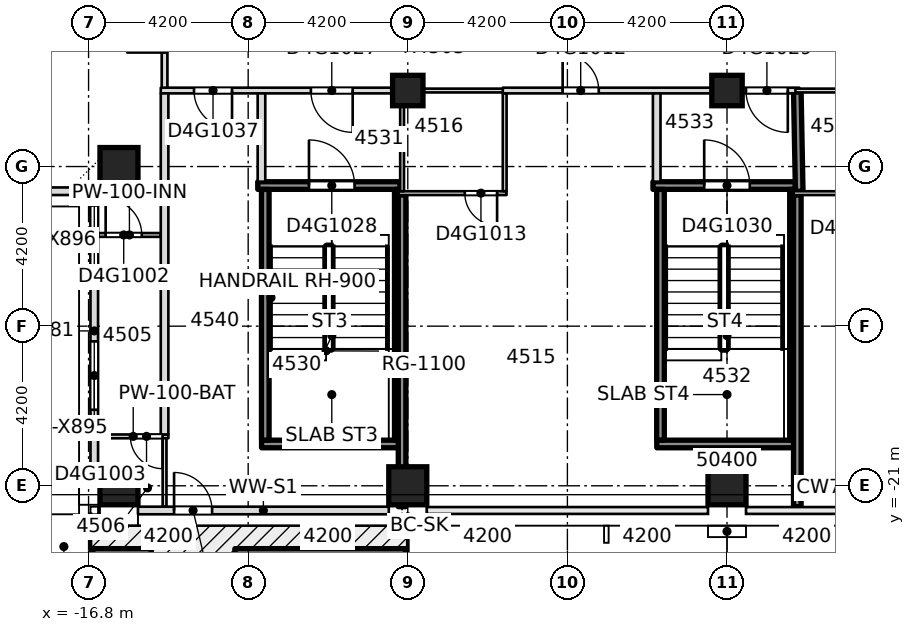
"""IFC4 building model, lengths in metres.
Left out: names, types, materials, properties, quantities, classifications, styles, units other than length and angle.
Written with IfcOpenShell. Run it as: python <this file> out.ifc"""

import sys

from ifc_helpers import new_model, si_unit, direction, frame, frame_2d, origin, origin_2d, place, context, subcontext, project, spatial, rectangle, extrude, element, fill, save


model = new_model("IFC4")
c1 = context("Model", 3, precision=1e-05, world=origin(), true_north=direction((0.0, 1.0)))
c2 = subcontext(c1, "Body", "Model", "MODEL_VIEW")
j1 = project(units=[si_unit("LENGTHUNIT", "METRE"), si_unit("PLANEANGLEUNIT", "RADIAN")], contexts=[c1])
p1 = place(None, origin())
s1 = spatial("IfcSite", under=j1, at=p1, CompositionType="ELEMENT")
p2 = place(p1, origin())
s2 = spatial("IfcBuilding", under=s1, at=p2, CompositionType="ELEMENT")
p3 = place(p2, frame((0.0, 0.0, 175.55)))
s3 = spatial("IfcBuildingStorey", under=s2, at=p3, CompositionType="ELEMENT", Elevation=175.55)
for number, where, z_axis, x_axis in (
    (1, (-16.0, -21.0, -0.4), (0.0, 0.0, 1.0), (1.0, 0.0, 0.0)),
    (2, (-8.4, -21.0, -0.4), (0.0, 0.0, 1.0), (1.0, 0.0, 0.0)),
    (3, (0.0, -21.0, -0.4), (0.0, 0.0, 1.0), (1.0, 0.0, 0.0)),
    (4, (-16.0, -12.6, -0.4), (0.0, 0.0, 1.0), (1.0, 0.0, 0.0)),
):
    element("IfcColumn", number, at=place(p3, frame(where, z_axis=z_axis, x_axis=x_axis)), inside=s3, PredefinedType="COLUMN", context=c2, shape_type="SweptSolid", body=[
        extrude(rectangle(XDim=1.0, YDim=1.0, at=origin_2d()), origin(), (0.0, 0.0, 1.0), 3.45),
    ])
for number, where, z_axis, x_axis in (
    (5, (-8.4, -10.6, -0.4), (0.0, 0.0, 1.0), (1.0, 0.0, 0.0)),
    (6, (0.0, -10.6, -0.4), (0.0, 0.0, 1.0), (1.0, 0.0, 0.0)),
):
    element("IfcColumn", number, at=place(p3, frame(where, z_axis=z_axis, x_axis=x_axis)), inside=s3, PredefinedType="COLUMN", context=c2, shape_type="SweptSolid", body=[
        extrude(rectangle(XDim=0.8, YDim=0.8, at=origin_2d()), origin(), (0.0, 0.0, 1.0), 3.45),
    ])
p4 = place(p3, frame((-16.55, -19.7, 0.0), z_axis=(0.0, 0.0, 1.0), x_axis=(1.0, 0.0, 0.0)))
e7 = element("IfcWall", 7, at=p4, inside=s3, PredefinedType="PARTITIONING", context=c2, shape_type="SweptSolid", body=[
    extrude(rectangle(XDim=1.85, YDim=0.1, at=frame_2d((0.925, 0.0))), origin(), (0.0, 0.0, 1.0), 3.05),
])
p5 = place(p4, frame((0.85, 0.0, 0.0)))
e8 = element("IfcOpeningElement", 8, at=p5, cuts=e7, PredefinedType="OPENING", context=c2, shape_type="SweptSolid", body=[
    extrude(rectangle(XDim=0.85, YDim=2.1, at=frame_2d((0.425, 1.05))), frame((0.0, 0.06, 0.0), z_axis=(0.0, -1.0, 0.0), x_axis=(1.0, 0.0, 0.0)), (0.0, 0.0, 1.0), 0.12),
])
p6 = place(p3, frame((-12.248, -19.9, 0.0), z_axis=(0.0, 0.0, 1.0), x_axis=(1.0, 0.0, 0.0)))
e9 = element("IfcWall", 9, at=p6, inside=s3, PredefinedType="SOLIDWALL", context=c2, shape_type="SweptSolid", body=[
    extrude(rectangle(XDim=3.696, YDim=0.2, at=frame_2d((1.848, 0.0))), origin(), (0.0, 0.0, 1.0), 3.05),
])
p7 = place(p3, frame((-1.848, -19.9, 0.0), z_axis=(0.0, 0.0, 1.0), x_axis=(1.0, 0.0, 0.0)))
e10 = element("IfcWall", 10, at=p7, inside=s3, PredefinedType="SOLIDWALL", context=c2, shape_type="SweptSolid", body=[
    extrude(rectangle(XDim=3.696, YDim=0.2, at=frame_2d((1.848, 0.0))), origin(), (0.0, 0.0, 1.0), 3.05),
])
p8 = place(p3, frame((-16.55, -14.4, 0.0), z_axis=(0.0, 0.0, 1.0), x_axis=(1.0, 0.0, 0.0)))
e11 = element("IfcWall", 11, at=p8, inside=s3, PredefinedType="PARTITIONING", context=c2, shape_type="SweptSolid", body=[
    extrude(rectangle(XDim=1.65, YDim=0.1, at=frame_2d((0.825, 0.0))), origin(), (0.0, 0.0, 1.0), 3.05),
])
p9 = place(p8, frame((0.2, 0.0, 0.0)))
e12 = element("IfcOpeningElement", 12, at=p9, cuts=e11, PredefinedType="OPENING", context=c2, shape_type="SweptSolid", body=[
    extrude(rectangle(XDim=0.95, YDim=2.1, at=frame_2d((0.475, 1.05))), frame((0.0, 0.06, 0.0), z_axis=(0.0, -1.0, 0.0), x_axis=(1.0, 0.0, 0.0)), (0.0, 0.0, 1.0), 0.12),
])
p10 = place(p3, frame((-8.65, -13.3, 0.0), z_axis=(0.0, 0.0, 1.0), x_axis=(1.0, 0.0, 0.0)))
e13 = element("IfcWall", 13, at=p10, inside=s3, PredefinedType="PARTITIONING", context=c2, shape_type="SweptSolid", body=[
    extrude(rectangle(XDim=2.848, YDim=0.1, at=frame_2d((1.424, 0.0))), origin(), (0.0, 0.0, 1.0), 3.05),
])
p11 = place(p10, frame((1.75, 0.0, 0.0)))
e14 = element("IfcOpeningElement", 14, at=p11, cuts=e13, PredefinedType="OPENING", context=c2, shape_type="SweptSolid", body=[
    extrude(rectangle(XDim=0.85, YDim=2.1, at=frame_2d((0.425, 1.05))), frame((0.0, 0.06, 0.0), z_axis=(0.0, -1.0, 0.0), x_axis=(1.0, 0.0, 0.0)), (0.0, 0.0, 1.0), 0.12),
])
p12 = place(p3, frame((1.75, -13.3, 0.0), z_axis=(0.0, 0.0, 1.0), x_axis=(1.0, 0.0, 0.0)))
e15 = element("IfcWall", 15, at=p12, inside=s3, PredefinedType="PARTITIONING", context=c2, shape_type="SweptSolid", body=[
    extrude(rectangle(XDim=2.85, YDim=0.1, at=frame_2d((1.425, 0.0))), origin(), (0.0, 0.0, 1.0), 3.05),
])
p13 = place(p12, frame((1.75, 0.0, 0.0)))
e16 = element("IfcOpeningElement", 16, at=p13, cuts=e15, PredefinedType="OPENING", context=c2, shape_type="SweptSolid", body=[
    extrude(rectangle(XDim=0.85, YDim=2.1, at=frame_2d((0.425, 1.05))), frame((0.0, 0.06, 0.0), z_axis=(0.0, -1.0, 0.0), x_axis=(1.0, 0.0, 0.0)), (0.0, 0.0, 1.0), 0.12),
])
p14 = place(p3, frame((-12.348, -13.1, 0.0), z_axis=(0.0, 0.0, 1.0), x_axis=(1.0, 0.0, 0.0)))
e17 = element("IfcWall", 17, at=p14, inside=s3, PredefinedType="SOLIDWALL", context=c2, shape_type="SweptSolid", body=[
    extrude(rectangle(XDim=3.746, YDim=0.2, at=frame_2d((1.873, 0.0))), origin(), (0.0, 0.0, 1.0), 3.05),
])
p15 = place(p14, frame((1.348, 0.0, 0.0)))
e18 = element("IfcOpeningElement", 18, at=p15, cuts=e17, PredefinedType="OPENING", context=c2, shape_type="SweptSolid", body=[
    extrude(rectangle(XDim=1.2, YDim=2.1, at=frame_2d((0.6, 1.05))), frame((0.0, 0.11, 0.0), z_axis=(0.0, -1.0, 0.0), x_axis=(1.0, 0.0, 0.0)), (0.0, 0.0, 1.0), 0.22),
])
p16 = place(p3, frame((-1.948, -13.1, 0.0), z_axis=(0.0, 0.0, 1.0), x_axis=(1.0, 0.0, 0.0)))
e19 = element("IfcWall", 19, at=p16, inside=s3, PredefinedType="SOLIDWALL", context=c2, shape_type="SweptSolid", body=[
    extrude(rectangle(XDim=3.746, YDim=0.2, at=frame_2d((1.873, 0.0))), origin(), (0.0, 0.0, 1.0), 3.05),
])
p17 = place(p16, frame((1.348, 0.0, 0.0)))
e20 = element("IfcOpeningElement", 20, at=p17, cuts=e19, PredefinedType="OPENING", context=c2, shape_type="SweptSolid", body=[
    extrude(rectangle(XDim=1.2, YDim=2.1, at=frame_2d((0.6, 1.05))), frame((0.0, 0.11, 0.0), z_axis=(0.0, -1.0, 0.0), x_axis=(1.0, 0.0, 0.0)), (0.0, 0.0, 1.0), 0.22),
])
p18 = place(p3, frame((-14.9, -10.6, 0.0), z_axis=(0.0, 0.0, 1.0), x_axis=(1.0, 0.0, 0.0)))
e21 = element("IfcWall", 21, at=p18, inside=s3, PredefinedType="PARTITIONING", context=c2, shape_type="SweptSolid", body=[
    extrude(rectangle(XDim=6.4, YDim=0.15, at=frame_2d((3.2, 0.0))), origin(), (0.0, 0.0, 1.0), 3.05),
])
p19 = place(p18, frame((3.95, 0.0, 0.0)))
e22 = element("IfcOpeningElement", 22, at=p19, cuts=e21, PredefinedType="OPENING", context=c2, shape_type="SweptSolid", body=[
    extrude(rectangle(XDim=1.1, YDim=2.1, at=frame_2d((0.55, 1.05))), frame((0.0, 0.085, 0.0), z_axis=(0.0, -1.0, 0.0), x_axis=(1.0, 0.0, 0.0)), (0.0, 0.0, 1.0), 0.17),
])
p20 = place(p18, frame((0.875, 0.0, 0.0)))
e23 = element("IfcOpeningElement", 23, at=p20, cuts=e21, PredefinedType="OPENING", context=c2, shape_type="SweptSolid", body=[
    extrude(rectangle(XDim=1.0, YDim=2.1, at=frame_2d((0.5, 1.05))), frame((0.0, 0.085, 0.0), z_axis=(0.0, -1.0, 0.0), x_axis=(1.0, 0.0, 0.0)), (0.0, 0.0, 1.0), 0.17),
])
p21 = place(p3, frame((-8.6, -10.6, 0.0), z_axis=(0.0, 0.0, 1.0), x_axis=(1.0, 0.0, 0.0)))
e24 = element("IfcWall", 24, at=p21, inside=s3, PredefinedType="PARTITIONING", context=c2, shape_type="SweptSolid", body=[
    extrude(rectangle(XDim=2.8, YDim=0.1, at=frame_2d((1.4, 0.0))), origin(), (0.0, 0.0, 1.0), 3.05),
])
p22 = place(p3, frame((-5.9, -10.6, 0.0), z_axis=(0.0, 0.0, 1.0), x_axis=(1.0, 0.0, 0.0)))
e25 = element("IfcWall", 25, at=p22, inside=s3, PredefinedType="PARTITIONING", context=c2, shape_type="SweptSolid", body=[
    extrude(rectangle(XDim=7.8, YDim=0.15, at=frame_2d((3.9, 0.0))), origin(), (0.0, 0.0, 1.0), 3.05),
])
p23 = place(p22, frame((1.575, 0.0, 0.0)))
e26 = element("IfcOpeningElement", 26, at=p23, cuts=e25, PredefinedType="OPENING", context=c2, shape_type="SweptSolid", body=[
    extrude(rectangle(XDim=0.95, YDim=2.1, at=frame_2d((0.475, 1.05))), frame((0.0, 0.085, 0.0), z_axis=(0.0, -1.0, 0.0), x_axis=(1.0, 0.0, 0.0)), (0.0, 0.0, 1.0), 0.17),
])
p24 = place(p22, frame((6.4, 0.0, 0.0)))
e27 = element("IfcOpeningElement", 27, at=p24, cuts=e25, PredefinedType="OPENING", context=c2, shape_type="SweptSolid", body=[
    extrude(rectangle(XDim=1.1, YDim=2.1, at=frame_2d((0.55, 1.05))), frame((0.0, 0.085, 0.0), z_axis=(0.0, -1.0, 0.0), x_axis=(1.0, 0.0, 0.0)), (0.0, 0.0, 1.0), 0.17),
])
p25 = place(p3, frame((1.8, -10.6, 0.0), z_axis=(0.0, 0.0, 1.0), x_axis=(1.0, 0.0, 0.0)))
e28 = element("IfcWall", 28, at=p25, inside=s3, PredefinedType="PARTITIONING", context=c2, shape_type="SweptSolid", body=[
    extrude(rectangle(XDim=2.8, YDim=0.1, at=frame_2d((1.4, 0.0))), origin(), (0.0, 0.0, 1.0), 3.05),
])
p26 = place(p3, frame((-14.8, -21.55, 0.0), z_axis=(0.0, 0.0, 1.0), x_axis=(0.0, 1.0, 0.0)))
e29 = element("IfcWall", 29, at=p26, inside=s3, PredefinedType="PARTITIONING", context=c2, shape_type="SweptSolid", body=[
    extrude(rectangle(XDim=1.8, YDim=0.1, at=frame_2d((0.9, 0.0))), origin(), (0.0, 0.0, 1.0), 3.05),
])
p27 = place(p3, frame((-14.8, -19.65, 0.0), z_axis=(0.0, 0.0, 1.0), x_axis=(0.0, 1.0, 0.0)))
e30 = element("IfcWall", 30, at=p27, inside=s3, PredefinedType="PARTITIONING", context=c2, shape_type="SweptSolid", body=[
    extrude(rectangle(XDim=8.975, YDim=0.2, at=frame_2d((4.487, 0.0))), origin(), (0.0, 0.0, 1.0), 3.05),
])
p28 = place(p3, frame((-14.8, -10.525, 0.0), z_axis=(0.0, 0.0, 1.0), x_axis=(0.0, 1.0, 0.0)))
e31 = element("IfcWall", 31, at=p28, inside=s3, PredefinedType="PARTITIONING", context=c2, shape_type="SweptSolid", body=[
    extrude(rectangle(XDim=18.965, YDim=0.15, at=frame_2d((9.482, 0.0))), origin(), (0.0, 0.0, 1.0), 3.05),
])
p29 = place(p28, frame((0.925, 0.0, 0.0)))
e32 = element("IfcOpeningElement", 32, at=p29, cuts=e31, PredefinedType="OPENING", context=c2, shape_type="SweptSolid", body=[
    extrude(rectangle(XDim=1.0, YDim=2.1, at=frame_2d((0.5, 1.05))), frame((0.0, 0.085, 0.0), z_axis=(0.0, -1.0, 0.0), x_axis=(1.0, 0.0, 0.0)), (0.0, 0.0, 1.0), 0.17),
])
p30 = place(p28, frame((15.97, 0.0, 0.0)))
e33 = element("IfcOpeningElement", 33, at=p30, cuts=e31, PredefinedType="OPENING", context=c2, shape_type="SweptSolid", body=[
    extrude(rectangle(XDim=1.0, YDim=2.1, at=frame_2d((0.5, 1.05))), frame((0.0, 0.085, 0.0), z_axis=(0.0, -1.0, 0.0), x_axis=(1.0, 0.0, 0.0)), (0.0, 0.0, 1.0), 0.17),
])
p31 = place(p28, frame((9.975, 0.0, 0.0)))
e34 = element("IfcOpeningElement", 34, at=p31, cuts=e31, PredefinedType="OPENING", context=c2, shape_type="SweptSolid", body=[
    extrude(rectangle(XDim=1.1, YDim=2.1, at=frame_2d((0.55, 1.05))), frame((0.0, 0.085, 0.0), z_axis=(0.0, -1.0, 0.0), x_axis=(1.0, 0.0, 0.0)), (0.0, 0.0, 1.0), 0.17),
])
p32 = place(p28, frame((4.825, 0.0, 0.0)))
e35 = element("IfcOpeningElement", 35, at=p32, cuts=e31, PredefinedType="OPENING", context=c2, shape_type="SweptSolid", body=[
    extrude(rectangle(XDim=1.0, YDim=2.1, at=frame_2d((0.5, 1.05))), frame((0.0, 0.085, 0.0), z_axis=(0.0, -1.0, 0.0), x_axis=(1.0, 0.0, 0.0)), (0.0, 0.0, 1.0), 0.17),
])
p33 = place(p3, frame((-12.25, -12.998, 0.0), z_axis=(0.0, 0.0, 1.0), x_axis=(0.0, 1.0, 0.0)))
e36 = element("IfcWall", 36, at=p33, inside=s3, PredefinedType="PARTITIONING", context=c2, shape_type="SweptSolid", body=[
    extrude(rectangle(XDim=2.323, YDim=0.2, at=frame_2d((1.162, 0.0))), origin(), (0.0, 0.0, 1.0), 3.05),
])
for number, where, z_axis, x_axis in (
    (37, (-12.15, -19.798, 0.0), (0.0, 0.0, 1.0), (0.0, 1.0, 0.0)),
    (38, (-8.65, -19.798, 0.0), (0.0, 0.0, 1.0), (0.0, 1.0, 0.0)),
):
    element("IfcWall", number, at=place(p3, frame(where, z_axis=z_axis, x_axis=x_axis)), inside=s3, PredefinedType="SOLIDWALL", context=c2, shape_type="SweptSolid", body=[
        extrude(rectangle(XDim=6.596, YDim=0.2, at=frame_2d((3.298, 0.0))), origin(), (0.0, 0.0, 1.0), 3.05),
    ])
p34 = place(p3, frame((-8.55, -13.25, 0.0), z_axis=(0.0, 0.0, 1.0), x_axis=(0.0, 1.0, 0.0)))
e39 = element("IfcWall", 39, at=p34, inside=s3, PredefinedType="PARTITIONING", context=c2, shape_type="SweptSolid", body=[
    extrude(rectangle(XDim=2.575, YDim=0.1, at=frame_2d((1.288, 0.0))), origin(), (0.0, 0.0, 1.0), 3.05),
])
p35 = place(p3, frame((-5.85, -13.248, 0.0), z_axis=(0.0, 0.0, 1.0), x_axis=(0.0, 1.0, 0.0)))
e40 = element("IfcWall", 40, at=p35, inside=s3, PredefinedType="PARTITIONING", context=c2, shape_type="SweptSolid", body=[
    extrude(rectangle(XDim=2.573, YDim=0.1, at=frame_2d((1.287, 0.0))), origin(), (0.0, 0.0, 1.0), 3.05),
])
p36 = place(p3, frame((-1.85, -12.998, 0.0), z_axis=(0.0, 0.0, 1.0), x_axis=(0.0, 1.0, 0.0)))
e41 = element("IfcWall", 41, at=p36, inside=s3, PredefinedType="PARTITIONING", context=c2, shape_type="SweptSolid", body=[
    extrude(rectangle(XDim=2.323, YDim=0.2, at=frame_2d((1.162, 0.0))), origin(), (0.0, 0.0, 1.0), 3.05),
])
for number, where, z_axis, x_axis in (
    (42, (-1.75, -19.798, 0.0), (0.0, 0.0, 1.0), (0.0, 1.0, 0.0)),
    (43, (1.75, -19.798, 0.0), (0.0, 0.0, 1.0), (0.0, 1.0, 0.0)),
):
    element("IfcWall", number, at=place(p3, frame(where, z_axis=z_axis, x_axis=x_axis)), inside=s3, PredefinedType="SOLIDWALL", context=c2, shape_type="SweptSolid", body=[
        extrude(rectangle(XDim=6.596, YDim=0.2, at=frame_2d((3.298, 0.0))), origin(), (0.0, 0.0, 1.0), 3.05),
    ])
p37 = place(p3, frame((1.9, -13.25, 0.0), z_axis=(0.0, 0.0, 1.0), x_axis=(-0.019062755699, 0.999818289163, 0.0)))
e44 = element("IfcWall", 44, at=p37, inside=s3, PredefinedType="SOLIDWALL", context=c2, shape_type="SweptSolid", body=[
    extrude(rectangle(XDim=2.625, YDim=0.2, at=frame_2d((1.313, 0.0))), origin(), (0.0, 0.0, 1.0), 3.05),
])
p38 = place(p3, frame((-15.5, -21.65, 0.0), z_axis=(0.0, 0.0, 1.0), x_axis=(1.0, 0.0, 0.0)))
e45 = element("IfcWall", 45, at=p38, inside=s3, PredefinedType="STANDARD", context=c2, shape_type="SweptSolid", body=[
    extrude(rectangle(XDim=6.6, YDim=0.2, at=frame_2d((3.3, 0.0))), origin(), (0.0, 0.0, 1.0), 3.05),
])
p39 = place(p38, frame((0.95, 0.0, 0.0)))
e46 = element("IfcOpeningElement", 46, at=p39, cuts=e45, PredefinedType="OPENING", context=c2, shape_type="SweptSolid", body=[
    extrude(rectangle(XDim=1.0, YDim=2.4, at=frame_2d((0.5, 1.2))), frame((0.0, 0.11, 0.0), z_axis=(0.0, -1.0, 0.0), x_axis=(1.0, 0.0, 0.0)), (0.0, 0.0, 1.0), 0.22),
])
p40 = place(p3, frame((-16.69, -22.954, -0.04), z_axis=(0.0, 0.0, 1.0), x_axis=(1.0, 0.0, 0.0)))
e47 = element("IfcWall", 47, at=p40, inside=s3, PredefinedType="USERDEFINED", context=c2, shape_type="SweptSolid", body=[
    extrude(rectangle(XDim=1.54, YDim=0.6, at=frame_2d((0.77, 0.0))), origin(), (0.0, 0.0, 1.0), 1.2),
])
p41 = place(p3, frame((-12.95, -22.954, -0.04), z_axis=(0.0, 0.0, 1.0), x_axis=(1.0, 0.0, 0.0)))
e48 = element("IfcWall", 48, at=p41, inside=s3, PredefinedType="USERDEFINED", context=c2, shape_type="SweptSolid", body=[
    extrude(rectangle(XDim=4.49, YDim=0.6, at=frame_2d((2.245, 0.0))), origin(), (0.0, 0.0, 1.0), 1.2),
])
p42 = place(p3, frame((-24.7, -13.25, 0.0), z_axis=(0.0, 0.0, 1.0), x_axis=(1.0, 0.0, 0.0)))
e49 = element("IfcWall", 49, at=p42, inside=s3, PredefinedType="STANDARD", context=c2, shape_type="SweptSolid", body=[
    extrude(rectangle(XDim=7.95, YDim=0.2, at=frame_2d((3.975, 0.0))), origin(), (0.0, 0.0, 1.0), 3.05),
])
p43 = place(p3, frame((-16.65, -13.35, 0.0), z_axis=(0.0, 0.0, 1.0), x_axis=(0.0, -1.0, 0.0)))
e50 = element("IfcWall", 50, at=p43, inside=s3, PredefinedType="STANDARD", context=c2, shape_type="SweptSolid", body=[
    extrude(rectangle(XDim=7.15, YDim=0.2, at=frame_2d((3.575, 0.0))), origin(), (0.0, 0.0, 1.0), 3.05),
])
p44 = place(p43, frame((3.85, 0.0, 0.2)))
e51 = element("IfcOpeningElement", 51, at=p44, cuts=e50, PredefinedType="OPENING", context=c2, shape_type="SweptSolid", body=[
    extrude(rectangle(XDim=1.8, YDim=2.65, at=frame_2d((0.9, 1.325))), frame((0.0, 0.11, 0.0), z_axis=(0.0, -1.0, 0.0), x_axis=(1.0, 0.0, 0.0)), (0.0, 0.0, 1.0), 0.22),
])
p45 = place(p43, frame((0.275, 0.0, 0.2)))
e52 = element("IfcOpeningElement", 52, at=p45, cuts=e50, PredefinedType="OPENING", context=c2, shape_type="SweptSolid", body=[
    extrude(rectangle(XDim=1.8, YDim=2.65, at=frame_2d((0.9, 1.325))), frame((0.0, 0.11, 0.0), z_axis=(0.0, -1.0, 0.0), x_axis=(1.0, 0.0, 0.0)), (0.0, 0.0, 1.0), 0.22),
])
for number, where, z_axis, x_axis in (
    (53, (1.85, -21.55, 0.0), (0.0, 0.0, 1.0), (0.0, 1.0, 0.0)),
    (54, (-8.55, -21.55, 0.0), (0.0, 0.0, 1.0), (0.0, 1.0, 0.0)),
):
    element("IfcWall", number, at=place(p3, frame(where, z_axis=z_axis, x_axis=x_axis)), inside=s3, PredefinedType="SOLIDWALL", context=c2, shape_type="SweptSolid", body=[
        extrude(rectangle(XDim=8.2, YDim=0.2, at=frame_2d((4.1, 0.0))), origin(), (0.0, 0.0, 1.0), 3.05),
    ])
p46 = place(p9, origin())
e55 = element("IfcDoor", 55, at=p46, inside=s3, OperationType="SINGLE_SWING_RIGHT", PredefinedType="DOOR", context=c2, shape_type="SweptSolid", body=[
    extrude(rectangle(XDim=0.95, YDim=2.1, at=frame_2d((0.475, 1.05))), frame((0.0, 0.025, 0.0), z_axis=(0.0, -1.0, 0.0), x_axis=(1.0, 0.0, 0.0)), (0.0, 0.0, 1.0), 0.05),
])
fill(e12, e55)
p47 = place(p5, origin())
e56 = element("IfcDoor", 56, at=p47, inside=s3, OperationType="SINGLE_SWING_RIGHT", PredefinedType="DOOR", context=c2, shape_type="SweptSolid", body=[
    extrude(rectangle(XDim=0.85, YDim=2.1, at=frame_2d((0.425, 1.05))), frame((0.0, 0.025, 0.0), z_axis=(0.0, -1.0, 0.0), x_axis=(1.0, 0.0, 0.0)), (0.0, 0.0, 1.0), 0.05),
])
fill(e8, e56)
p48 = place(p23, origin())
e57 = element("IfcDoor", 57, at=p48, inside=s3, OperationType="SINGLE_SWING_LEFT", PredefinedType="DOOR", context=c2, shape_type="SweptSolid", body=[
    extrude(rectangle(XDim=0.95, YDim=2.1, at=frame_2d((0.475, 1.05))), frame((0.0, 0.025, 0.0), z_axis=(0.0, -1.0, 0.0), x_axis=(1.0, 0.0, 0.0)), (0.0, 0.0, 1.0), 0.05),
])
fill(e26, e57)
p49 = place(p11, origin())
e58 = element("IfcDoor", 58, at=p49, inside=s3, OperationType="SINGLE_SWING_RIGHT", PredefinedType="DOOR", context=c2, shape_type="SweptSolid", body=[
    extrude(rectangle(XDim=0.85, YDim=2.1, at=frame_2d((0.425, 1.05))), frame((0.0, 0.025, 0.0), z_axis=(0.0, -1.0, 0.0), x_axis=(1.0, 0.0, 0.0)), (0.0, 0.0, 1.0), 0.05),
])
fill(e14, e58)
p50 = place(p19, origin())
e59 = element("IfcDoor", 59, at=p50, inside=s3, OperationType="SINGLE_SWING_RIGHT", PredefinedType="DOOR", context=c2, shape_type="SweptSolid", body=[
    extrude(rectangle(XDim=1.1, YDim=2.1, at=frame_2d((0.55, 1.05))), frame((0.0, 0.025, 0.0), z_axis=(0.0, -1.0, 0.0), x_axis=(1.0, 0.0, 0.0)), (0.0, 0.0, 1.0), 0.05),
])
fill(e22, e59)
p51 = place(p15, origin())
e60 = element("IfcDoor", 60, at=p51, inside=s3, OperationType="SINGLE_SWING_RIGHT", PredefinedType="DOOR", context=c2, shape_type="SweptSolid", body=[
    extrude(rectangle(XDim=1.2, YDim=2.1, at=frame_2d((0.6, 1.05))), frame((0.0, 0.025, 0.0), z_axis=(0.0, -1.0, 0.0), x_axis=(1.0, 0.0, 0.0)), (0.0, 0.0, 1.0), 0.05),
])
fill(e18, e60)
p52 = place(p24, origin())
e61 = element("IfcDoor", 61, at=p52, inside=s3, OperationType="SINGLE_SWING_LEFT", PredefinedType="DOOR", context=c2, shape_type="SweptSolid", body=[
    extrude(rectangle(XDim=1.1, YDim=2.1, at=frame_2d((0.55, 1.05))), frame((0.0, 0.025, 0.0), z_axis=(0.0, -1.0, 0.0), x_axis=(1.0, 0.0, 0.0)), (0.0, 0.0, 1.0), 0.05),
])
fill(e27, e61)
p53 = place(p17, origin())
e62 = element("IfcDoor", 62, at=p53, inside=s3, OperationType="SINGLE_SWING_RIGHT", PredefinedType="DOOR", context=c2, shape_type="SweptSolid", body=[
    extrude(rectangle(XDim=1.2, YDim=2.1, at=frame_2d((0.6, 1.05))), frame((0.0, 0.025, 0.0), z_axis=(0.0, -1.0, 0.0), x_axis=(1.0, 0.0, 0.0)), (0.0, 0.0, 1.0), 0.05),
])
fill(e20, e62)
p54 = place(p20, origin())
e63 = element("IfcDoor", 63, at=p54, inside=s3, OperationType="SINGLE_SWING_RIGHT", PredefinedType="DOOR", context=c2, shape_type="SweptSolid", body=[
    extrude(rectangle(XDim=1.0, YDim=2.1, at=frame_2d((0.5, 1.05))), frame((0.0, 0.025, 0.0), z_axis=(0.0, -1.0, 0.0), x_axis=(1.0, 0.0, 0.0)), (0.0, 0.0, 1.0), 0.05),
])
fill(e23, e63)
p55 = place(p39, origin())
e64 = element("IfcDoor", 64, at=p55, inside=s3, OperationType="SINGLE_SWING_LEFT", PredefinedType="DOOR", context=c2, shape_type="SweptSolid", body=[
    extrude(rectangle(XDim=1.0, YDim=2.4, at=frame_2d((0.5, 1.2))), frame((0.0, 0.025, 0.0), z_axis=(0.0, -1.0, 0.0), x_axis=(1.0, 0.0, 0.0)), (0.0, 0.0, 1.0), 0.05),
])
fill(e46, e64)
p56 = place(p44, origin())
e65 = element("IfcWindow", 65, at=p56, inside=s3, PartitioningType="SINGLE_PANEL", PredefinedType="WINDOW", context=c2, shape_type="SweptSolid", body=[
    extrude(rectangle(XDim=1.8, YDim=2.65, at=frame_2d((0.9, 1.325))), frame((0.0, 0.03, 0.0), z_axis=(0.0, -1.0, 0.0), x_axis=(1.0, 0.0, 0.0)), (0.0, 0.0, 1.0), 0.06),
])
fill(e51, e65)
p57 = place(p45, origin())
e66 = element("IfcWindow", 66, at=p57, inside=s3, PartitioningType="SINGLE_PANEL", PredefinedType="WINDOW", context=c2, shape_type="SweptSolid", body=[
    extrude(rectangle(XDim=1.8, YDim=2.65, at=frame_2d((0.9, 1.325))), frame((0.0, 0.03, 0.0), z_axis=(0.0, -1.0, 0.0), x_axis=(1.0, 0.0, 0.0)), (0.0, 0.0, 1.0), 0.06),
])
fill(e52, e66)
save(model, sys.argv[1])
